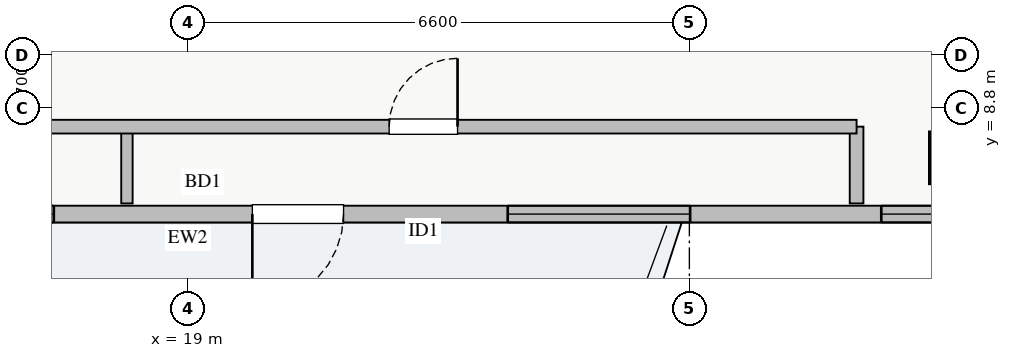
"""IFC4 building model, lengths in metres.
Left out: names, types, materials, properties, quantities, classifications, styles, units other than length and angle.
Written with IfcOpenShell. Run it as: python <this file> out.ifc"""

import sys

from ifc_helpers import new_model, si_unit, direction, frame, frame_2d, origin, origin_2d, place, context, subcontext, project, spatial, rectangle, extrude, source, transform, mapped, element, fill, save


model = new_model("IFC4")
c1 = context("Model", 3, precision=1e-05, world=origin(), true_north=direction((0.0, 1.0)))
c2 = subcontext(c1, "Body", "Model", "MODEL_VIEW")
j1 = project(units=[si_unit("LENGTHUNIT", "METRE"), si_unit("PLANEANGLEUNIT", "RADIAN")], contexts=[c1])
p1 = place(None, origin())
s1 = spatial("IfcSite", under=j1, at=p1, CompositionType="ELEMENT")
p2 = place(p1, origin())
s2 = spatial("IfcBuilding", under=s1, at=p2, CompositionType="ELEMENT")
p3 = place(p2, frame((0.0, 0.0, 250.25)))
s3 = spatial("IfcBuildingStorey", under=s2, at=p3, CompositionType="ELEMENT", Elevation=250.25)
m1 = source(origin(), c2, "Body", "SweptSolid", [
    extrude(rectangle(XDim=0.65, YDim=0.65, at=origin_2d()), origin(), (0.0, 0.0, 1.0), 3.25),
])
p4 = place(p3, frame((29.1, 8.15, 0.0), z_axis=(0.0, 0.0, 1.0), x_axis=(1.0, 0.0, 0.0)))
e1 = element("IfcColumn", 1, at=p4, inside=s3, PredefinedType="COLUMN", context=c2, shape_type="MappedRepresentation", body=[
    mapped(m1, transform((0.0, 0.0, 0.0), x_axis=(1.0, 0.0, 0.0), y_axis=(0.0, 1.0, 0.0), z_axis=(0.0, 0.0, 1.0), scale=1.0)),
])
p5 = place(p3, frame((8.35, 7.41, 0.0), z_axis=(0.0, 0.0, 1.0), x_axis=(1.0, 0.0, 0.0)))
e2 = element("IfcWall", 2, at=p5, inside=s3, PredefinedType="STANDARD", context=c2, shape_type="SweptSolid", body=[
    extrude(rectangle(XDim=21.3, YDim=0.22, at=frame_2d((10.65, 0.0))), origin(), (0.0, 0.0, 1.0), 2.61),
])
p6 = place(p5, frame((11.5, 0.0, 0.0)))
e3 = element("IfcOpeningElement", 3, at=p6, cuts=e2, PredefinedType="OPENING", context=c2, shape_type="SweptSolid", body=[
    extrude(rectangle(XDim=1.2, YDim=2.1, at=frame_2d((0.6, 1.05))), frame((0.0, 0.12, 0.0), z_axis=(0.0, -1.0, 0.0), x_axis=(1.0, 0.0, 0.0)), (0.0, 0.0, 1.0), 0.24),
])
p7 = place(p5, frame((1.463, 0.0, 0.9)))
e4 = element("IfcOpeningElement", 4, at=p7, cuts=e2, PredefinedType="OPENING", context=c2, shape_type="SweptSolid", body=[
    extrude(rectangle(XDim=2.4, YDim=1.48, at=frame_2d((1.2, 0.74))), frame((0.0, 0.12, 0.0), z_axis=(0.0, -1.0, 0.0), x_axis=(1.0, 0.0, 0.0)), (0.0, 0.0, 1.0), 0.24),
])
p8 = place(p5, frame((7.088, 0.0, 0.9)))
e5 = element("IfcOpeningElement", 5, at=p8, cuts=e2, PredefinedType="OPENING", context=c2, shape_type="SweptSolid", body=[
    extrude(rectangle(XDim=1.8, YDim=1.45, at=frame_2d((0.9, 0.725))), frame((0.0, 0.12, 0.0), z_axis=(0.0, -1.0, 0.0), x_axis=(1.0, 0.0, 0.0)), (0.0, 0.0, 1.0), 0.24),
])
p9 = place(p5, frame((19.775, 0.0, 0.9)))
e6 = element("IfcOpeningElement", 6, at=p9, cuts=e2, PredefinedType="OPENING", context=c2, shape_type="SweptSolid", body=[
    extrude(rectangle(XDim=1.2, YDim=1.4, at=frame_2d((0.6, 0.7))), frame((0.0, 0.12, 0.0), z_axis=(0.0, -1.0, 0.0), x_axis=(1.0, 0.0, 0.0)), (0.0, 0.0, 1.0), 0.24),
])
p10 = place(p5, frame((14.86, 0.0, 0.9)))
e7 = element("IfcOpeningElement", 7, at=p10, cuts=e2, PredefinedType="OPENING", context=c2, shape_type="SweptSolid", body=[
    extrude(rectangle(XDim=2.4, YDim=1.5, at=frame_2d((1.2, 0.75))), frame((0.0, 0.12, 0.0), z_axis=(0.0, -1.0, 0.0), x_axis=(1.0, 0.0, 0.0)), (0.0, 0.0, 1.0), 0.24),
])
p11 = place(p3, frame((27.8, 7.55, 0.0), z_axis=(0.0, 0.0, 1.0), x_axis=(0.0, 1.0, 0.0)))
e8 = element("IfcWall", 8, at=p11, inside=s3, PredefinedType="PARTITIONING", context=c2, shape_type="SweptSolid", body=[
    extrude(rectangle(XDim=1.01, YDim=0.18, at=frame_2d((0.505, 0.0))), origin(), (0.0, 0.0, 1.0), 3.07),
])
p12 = place(p3, frame((18.2, 7.55, 0.0), z_axis=(0.0, 0.0, 1.0), x_axis=(0.0, 1.0, 0.0)))
e9 = element("IfcWall", 9, at=p12, inside=s3, PredefinedType="PARTITIONING", context=c2, shape_type="SweptSolid", body=[
    extrude(rectangle(XDim=1.01, YDim=0.15, at=frame_2d((0.505, 0.0))), origin(), (0.0, 0.0, 1.0), 3.07),
])
p13 = place(p3, frame((8.85, 8.56, 0.0), z_axis=(0.0, 0.0, 1.0), x_axis=(1.0, 0.0, 0.0)))
e10 = element("IfcWall", 10, at=p13, inside=s3, PredefinedType="PARTITIONING", context=c2, shape_type="SweptSolid", body=[
    extrude(rectangle(XDim=18.95, YDim=0.18, at=frame_2d((9.475, 0.0))), origin(), (0.0, 0.0, 1.0), 3.07),
])
p14 = place(p13, frame((4.2, 0.0, 0.0)))
e11 = element("IfcOpeningElement", 11, at=p14, cuts=e10, PredefinedType="OPENING", context=c2, shape_type="SweptSolid", body=[
    extrude(rectangle(XDim=0.9, YDim=2.05, at=frame_2d((0.45, 1.025))), frame((0.0, 0.1, 0.0), z_axis=(0.0, -1.0, 0.0), x_axis=(1.0, 0.0, 0.0)), (0.0, 0.0, 1.0), 0.2),
])
p15 = place(p13, frame((12.8, 0.0, 0.0)))
e12 = element("IfcOpeningElement", 12, at=p15, cuts=e10, PredefinedType="OPENING", context=c2, shape_type="SweptSolid", body=[
    extrude(rectangle(XDim=0.9, YDim=2.05, at=frame_2d((0.45, 1.025))), frame((0.0, 0.1, 0.0), z_axis=(0.0, -1.0, 0.0), x_axis=(1.0, 0.0, 0.0)), (0.0, 0.0, 1.0), 0.2),
])
m2 = source(origin(), c2, "Body", "SweptSolid", [
    extrude(rectangle(XDim=1.2, YDim=2.1, at=frame_2d((0.6, 1.05))), frame((0.0, 0.025, 0.0), z_axis=(0.0, -1.0, 0.0), x_axis=(1.0, 0.0, 0.0)), (0.0, 0.0, 1.0), 0.05),
])
p16 = place(p6, frame((1.2, 0.0, 0.0), z_axis=(0.0, 0.0, 1.0), x_axis=(-1.0, 0.0, 0.0)))
e13 = element("IfcDoor", 13, at=p16, inside=s3, OperationType="SINGLE_SWING_LEFT", PredefinedType="DOOR", context=c2, shape_type="MappedRepresentation", body=[
    mapped(m2, transform((0.0, 0.0, 0.0), x_axis=(1.0, 0.0, 0.0), y_axis=(0.0, 1.0, 0.0), z_axis=(0.0, 0.0, 1.0), scale=1.0)),
])
fill(e3, e13)
m3 = source(origin(), c2, "Body", "SweptSolid", [
    extrude(rectangle(XDim=1.8, YDim=1.45, at=frame_2d((0.9, 0.725))), frame((0.0, 0.03, 0.0), z_axis=(0.0, -1.0, 0.0), x_axis=(1.0, 0.0, 0.0)), (0.0, 0.0, 1.0), 0.06),
])
p17 = place(p8, origin())
e14 = element("IfcWindow", 14, at=p17, inside=s3, PartitioningType="DOUBLE_PANEL_VERTICAL", PredefinedType="WINDOW", context=c2, shape_type="MappedRepresentation", body=[
    mapped(m3, transform((0.0, 0.0, 0.0), x_axis=(1.0, 0.0, 0.0), y_axis=(0.0, 1.0, 0.0), z_axis=(0.0, 0.0, 1.0), scale=1.0)),
])
fill(e5, e14)
m4 = source(origin(), c2, "Body", "SweptSolid", [
    extrude(rectangle(XDim=1.2, YDim=1.4, at=frame_2d((0.6, 0.7))), frame((0.0, 0.03, 0.0), z_axis=(0.0, -1.0, 0.0), x_axis=(1.0, 0.0, 0.0)), (0.0, 0.0, 1.0), 0.06),
])
p18 = place(p9, origin())
e15 = element("IfcWindow", 15, at=p18, inside=s3, PartitioningType="TRIPLE_PANEL_VERTICAL", PredefinedType="WINDOW", context=c2, shape_type="MappedRepresentation", body=[
    mapped(m4, transform((0.0, 0.0, 0.0), x_axis=(1.0, 0.0, 0.0), y_axis=(0.0, 1.0, 0.0), z_axis=(0.0, 0.0, 1.0), scale=1.0)),
])
fill(e6, e15)
m5 = source(origin(), c2, "Body", "SweptSolid", [
    extrude(rectangle(XDim=0.9, YDim=2.05, at=frame_2d((0.45, 1.025))), frame((0.0, 0.025, 0.0), z_axis=(0.0, -1.0, 0.0), x_axis=(1.0, 0.0, 0.0)), (0.0, 0.0, 1.0), 0.05),
])
p19 = place(p15, origin())
e16 = element("IfcDoor", 16, at=p19, inside=s3, OperationType="SINGLE_SWING_RIGHT", PredefinedType="DOOR", context=c2, shape_type="MappedRepresentation", body=[
    mapped(m5, transform((0.0, 0.0, 0.0), x_axis=(1.0, 0.0, 0.0), y_axis=(0.0, 1.0, 0.0), z_axis=(0.0, 0.0, 1.0), scale=1.0)),
])
fill(e12, e16)
m6 = source(origin(), c2, "Body", "SweptSolid", [
    extrude(rectangle(XDim=2.4, YDim=1.5, at=frame_2d((1.2, 0.75))), frame((0.0, 0.03, 0.0), z_axis=(0.0, -1.0, 0.0), x_axis=(1.0, 0.0, 0.0)), (0.0, 0.0, 1.0), 0.06),
])
p20 = place(p10, origin())
e17 = element("IfcWindow", 17, at=p20, inside=s3, PartitioningType="TRIPLE_PANEL_VERTICAL", PredefinedType="WINDOW", context=c2, shape_type="MappedRepresentation", body=[
    mapped(m6, transform((0.0, 0.0, 0.0), x_axis=(1.0, 0.0, 0.0), y_axis=(0.0, 1.0, 0.0), z_axis=(0.0, 0.0, 1.0), scale=1.0)),
])
fill(e7, e17)
save(model, sys.argv[1])
